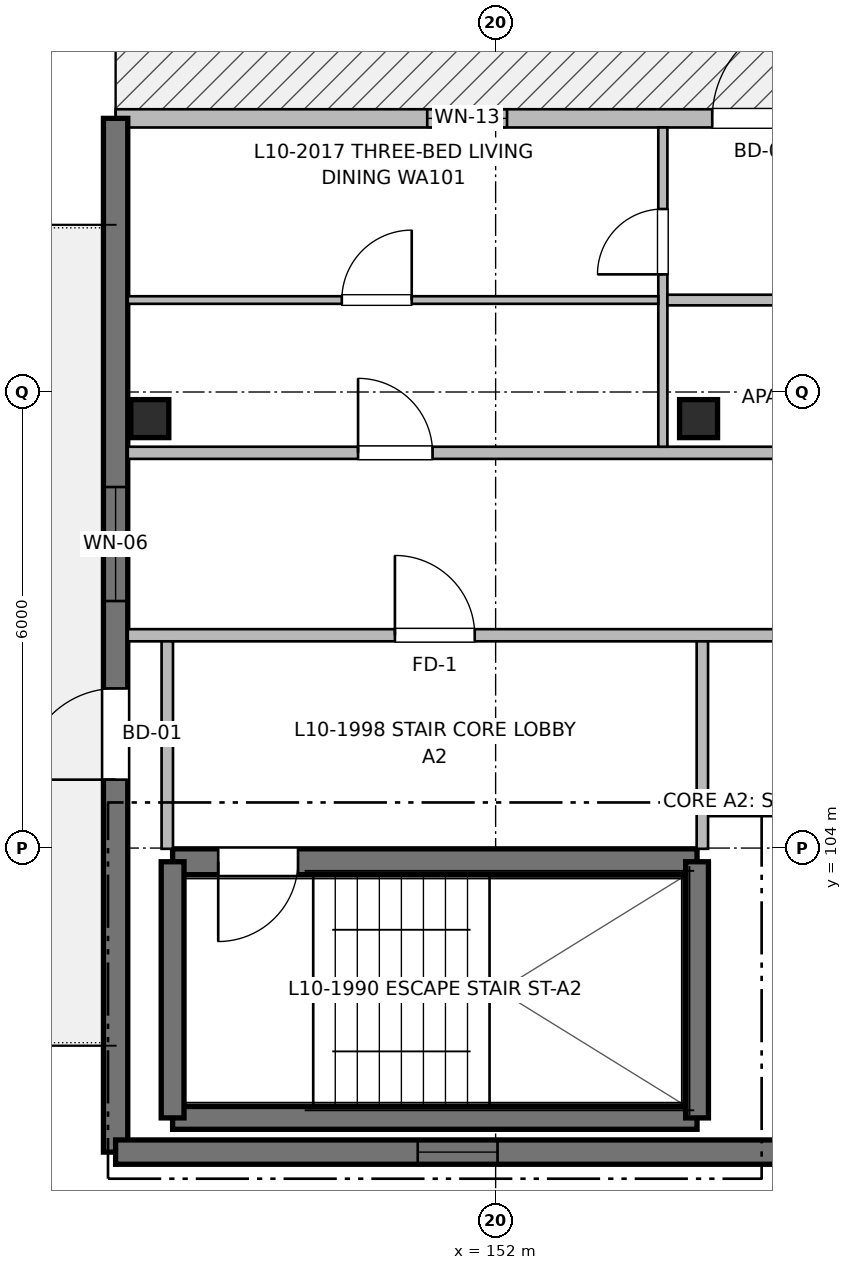
"""IFC4 building model, lengths in metres.
Left out: names, types, materials, properties, quantities, classifications, styles, units other than length and angle.
Written with IfcOpenShell. Run it as: python <this file> out.ifc"""

import sys

from ifc_helpers import new_model, si_unit, direction, frame, frame_2d, origin, origin_2d, place, context, subcontext, project, spatial, rectangle, extrude, element, fill, save


model = new_model("IFC4")
c1 = context("Model", 3, precision=1e-05, world=origin(), true_north=direction((0.0, 1.0)))
c2 = subcontext(c1, "Body", "Model", "MODEL_VIEW")
j1 = project(units=[si_unit("LENGTHUNIT", "METRE"), si_unit("PLANEANGLEUNIT", "RADIAN")], contexts=[c1])
p1 = place(None, origin())
s1 = spatial("IfcSite", under=j1, at=p1, CompositionType="ELEMENT")
p2 = place(p1, origin())
s2 = spatial("IfcBuilding", under=s1, at=p2, CompositionType="ELEMENT")
p3 = place(p2, frame((0.0, 0.0, 32.96)))
s3 = spatial("IfcBuildingStorey", under=s2, at=p3, CompositionType="ELEMENT", Elevation=32.96)
for number, where, z_axis, x_axis in (
    (1, (147.45, 109.65, 0.0), (0.0, 0.0, 1.0), (1.0, 0.0, 0.0)),
    (2, (154.67, 109.65, 0.0), (0.0, 0.0, 1.0), (1.0, 0.0, 0.0)),
):
    element("IfcColumn", number, at=place(p3, frame(where, z_axis=z_axis, x_axis=x_axis)), inside=s3, PredefinedType="COLUMN", context=c2, shape_type="SweptSolid", body=[
        extrude(rectangle(XDim=0.5, YDim=0.5, at=origin_2d()), origin(), (0.0, 0.0, 1.0), 3.2),
    ])
p4 = place(p3, frame((147.75, 100.45, 0.0), z_axis=(0.0, 0.0, 1.0), x_axis=(1.0, 0.0, 0.0)))
e3 = element("IfcWall", 3, at=p4, inside=s3, PredefinedType="SHEAR", context=c2, shape_type="SweptSolid", body=[
    extrude(rectangle(XDim=6.9, YDim=0.3, at=frame_2d((3.45, 0.0))), origin(), (0.0, 0.0, 1.0), 3.2),
])
p5 = place(p3, frame((154.65, 103.82, 0.0), z_axis=(0.0, 0.0, 1.0), x_axis=(-1.0, 0.0, 0.0)))
e4 = element("IfcWall", 4, at=p5, inside=s3, PredefinedType="SHEAR", context=c2, shape_type="SweptSolid", body=[
    extrude(rectangle(XDim=6.9, YDim=0.34, at=frame_2d((3.45, 0.0))), origin(), (0.0, 0.0, 1.0), 3.2),
])
p6 = place(p5, frame((5.25, 0.0, 0.0)))
e5 = element("IfcOpeningElement", 5, at=p6, cuts=e4, PredefinedType="OPENING", context=c2, shape_type="SweptSolid", body=[
    extrude(rectangle(XDim=1.05, YDim=2.15, at=frame_2d((0.525, 1.075))), frame((0.0, 0.18, 0.0), z_axis=(0.0, -1.0, 0.0), x_axis=(1.0, 0.0, 0.0)), (0.0, 0.0, 1.0), 0.36),
])
for number, where, z_axis, x_axis in (
    (6, (147.75, 103.82, 0.0), (0.0, 0.0, 1.0), (0.0, -1.0, 0.0)),
    (7, (154.65, 100.45, 0.0), (0.0, 0.0, 1.0), (0.0, 1.0, 0.0)),
):
    element("IfcWall", number, at=place(p3, frame(where, z_axis=z_axis, x_axis=x_axis)), inside=s3, PredefinedType="SHEAR", context=c2, shape_type="SweptSolid", body=[
        extrude(rectangle(XDim=3.37, YDim=0.3, at=frame_2d((1.685, 0.0))), origin(), (0.0, 0.0, 1.0), 3.2),
    ])
p7 = place(p3, frame((147.0, 113.6, 0.0), z_axis=(0.0, 0.0, 1.0), x_axis=(1.0, 0.0, 0.0)))
e8 = element("IfcWall", 8, at=p7, inside=s3, PredefinedType="SOLIDWALL", context=c2, shape_type="SweptSolid", body=[
    extrude(rectangle(XDim=37.0, YDim=0.24, at=frame_2d((18.5, 0.0))), origin(), (0.0, 0.0, 1.0), 2.98),
])
p8 = place(p7, frame((7.85, 0.0, 0.0)))
e9 = element("IfcOpeningElement", 9, at=p8, cuts=e8, PredefinedType="OPENING", context=c2, shape_type="SweptSolid", body=[
    extrude(rectangle(XDim=1.35, YDim=2.2, at=frame_2d((0.675, 1.1))), frame((0.0, 0.13, 0.0), z_axis=(0.0, -1.0, 0.0), x_axis=(1.0, 0.0, 0.0)), (0.0, 0.0, 1.0), 0.26),
])
p9 = place(p7, frame((4.1, 0.0, 0.9)))
e10 = element("IfcOpeningElement", 10, at=p9, cuts=e8, PredefinedType="OPENING", context=c2, shape_type="SweptSolid", body=[
    extrude(rectangle(XDim=1.05, YDim=1.15, at=frame_2d((0.525, 0.575))), frame((0.0, 0.13, 0.0), z_axis=(0.0, -1.0, 0.0), x_axis=(1.0, 0.0, 0.0)), (0.0, 0.0, 1.0), 0.26),
])
p10 = place(p7, frame((13.275, 0.0, 0.9)))
e11 = element("IfcOpeningElement", 11, at=p10, cuts=e8, PredefinedType="OPENING", context=c2, shape_type="SweptSolid", body=[
    extrude(rectangle(XDim=1.2, YDim=1.05, at=frame_2d((0.6, 0.525))), frame((0.0, 0.13, 0.0), z_axis=(0.0, -1.0, 0.0), x_axis=(1.0, 0.0, 0.0)), (0.0, 0.0, 1.0), 0.26),
])
p11 = place(p7, frame((22.8, 0.0, 0.9)))
e12 = element("IfcOpeningElement", 12, at=p11, cuts=e8, PredefinedType="OPENING", context=c2, shape_type="SweptSolid", body=[
    extrude(rectangle(XDim=0.65, YDim=0.95, at=frame_2d((0.325, 0.475))), frame((0.0, 0.13, 0.0), z_axis=(0.0, -1.0, 0.0), x_axis=(1.0, 0.0, 0.0)), (0.0, 0.0, 1.0), 0.26),
])
p12 = place(p7, frame((32.275, 0.0, 0.62)))
e13 = element("IfcOpeningElement", 13, at=p12, cuts=e8, PredefinedType="OPENING", context=c2, shape_type="SweptSolid", body=[
    extrude(rectangle(XDim=1.1, YDim=1.6, at=frame_2d((0.55, 0.8))), frame((0.0, 0.13, 0.0), z_axis=(0.0, -1.0, 0.0), x_axis=(1.0, 0.0, 0.0)), (0.0, 0.0, 1.0), 0.26),
])
p13 = place(p7, frame((27.445, 0.0, 0.82)))
e14 = element("IfcOpeningElement", 14, at=p13, cuts=e8, PredefinedType="OPENING", context=c2, shape_type="SweptSolid", body=[
    extrude(rectangle(XDim=1.5, YDim=1.4, at=frame_2d((0.75, 0.7))), frame((0.0, 0.13, 0.0), z_axis=(0.0, -1.0, 0.0), x_axis=(1.0, 0.0, 0.0)), (0.0, 0.0, 1.0), 0.26),
])
p14 = place(p3, frame((147.0, 100.0, 0.0), z_axis=(0.0, 0.0, 1.0), x_axis=(0.0, 1.0, 0.0)))
e15 = element("IfcWall", 15, at=p14, inside=s3, PredefinedType="SHEAR", context=c2, shape_type="SweptSolid", body=[
    extrude(rectangle(XDim=13.6, YDim=0.32, at=frame_2d((6.8, 0.0))), origin(), (0.0, 0.0, 1.0), 2.98),
])
p15 = place(p14, frame((4.9, 0.0, 0.0)))
e16 = element("IfcOpeningElement", 16, at=p15, cuts=e15, PredefinedType="OPENING", context=c2, shape_type="SweptSolid", body=[
    extrude(rectangle(XDim=1.2, YDim=2.2, at=frame_2d((0.6, 1.1))), frame((0.0, 0.17, 0.0), z_axis=(0.0, -1.0, 0.0), x_axis=(1.0, 0.0, 0.0)), (0.0, 0.0, 1.0), 0.34),
])
p16 = place(p14, frame((7.25, 0.0, 0.82)))
e17 = element("IfcOpeningElement", 17, at=p16, cuts=e15, PredefinedType="OPENING", context=c2, shape_type="SweptSolid", body=[
    extrude(rectangle(XDim=1.5, YDim=1.4, at=frame_2d((0.75, 0.7))), frame((0.0, 0.17, 0.0), z_axis=(0.0, -1.0, 0.0), x_axis=(1.0, 0.0, 0.0)), (0.0, 0.0, 1.0), 0.34),
])
p17 = place(p3, frame((156.0, 100.0, 0.0), z_axis=(0.0, 0.0, 1.0), x_axis=(-1.0, 0.0, 0.0)))
e18 = element("IfcWall", 18, at=p17, inside=s3, PredefinedType="SHEAR", context=c2, shape_type="SweptSolid", body=[
    extrude(rectangle(XDim=9.0, YDim=0.32, at=frame_2d((4.5, 0.0))), origin(), (0.0, 0.0, 1.0), 2.98),
])
p18 = place(p17, frame((3.975, 0.0, 0.9)))
e19 = element("IfcOpeningElement", 19, at=p18, cuts=e18, PredefinedType="OPENING", context=c2, shape_type="SweptSolid", body=[
    extrude(rectangle(XDim=1.05, YDim=1.15, at=frame_2d((0.525, 0.575))), frame((0.0, 0.17, 0.0), z_axis=(0.0, -1.0, 0.0), x_axis=(1.0, 0.0, 0.0)), (0.0, 0.0, 1.0), 0.34),
])
p19 = place(p3, frame((147.16, 106.8, 0.0), z_axis=(0.0, 0.0, 1.0), x_axis=(1.0, 0.0, 0.0)))
e20 = element("IfcWall", 20, at=p19, inside=s3, PredefinedType="PARTITIONING", context=c2, shape_type="SweptSolid", body=[
    extrude(rectangle(XDim=27.64, YDim=0.16, at=frame_2d((13.82, 0.0))), origin(), (0.0, 0.0, 1.0), 2.935),
])
p20 = place(p19, frame((3.515, 0.0, 0.0)))
e21 = element("IfcOpeningElement", 21, at=p20, cuts=e20, PredefinedType="OPENING", context=c2, shape_type="SweptSolid", body=[
    extrude(rectangle(XDim=1.05, YDim=2.15, at=frame_2d((0.525, 1.075))), frame((0.0, 0.09, 0.0), z_axis=(0.0, -1.0, 0.0), x_axis=(1.0, 0.0, 0.0)), (0.0, 0.0, 1.0), 0.18),
])
p21 = place(p19, frame((10.69, 0.0, 0.0)))
e22 = element("IfcOpeningElement", 22, at=p21, cuts=e20, PredefinedType="OPENING", context=c2, shape_type="SweptSolid", body=[
    extrude(rectangle(XDim=0.98, YDim=2.15, at=frame_2d((0.49, 1.075))), frame((0.0, 0.09, 0.0), z_axis=(0.0, -1.0, 0.0), x_axis=(1.0, 0.0, 0.0)), (0.0, 0.0, 1.0), 0.18),
])
p22 = place(p3, frame((147.16, 109.2, 0.0), z_axis=(0.0, 0.0, 1.0), x_axis=(1.0, 0.0, 0.0)))
e23 = element("IfcWall", 23, at=p22, inside=s3, PredefinedType="PARTITIONING", context=c2, shape_type="SweptSolid", body=[
    extrude(rectangle(XDim=36.68, YDim=0.16, at=frame_2d((18.34, 0.0))), origin(), (0.0, 0.0, 1.0), 2.935),
])
p23 = place(p22, frame((3.03, 0.0, 0.0)))
e24 = element("IfcOpeningElement", 24, at=p23, cuts=e23, PredefinedType="OPENING", context=c2, shape_type="SweptSolid", body=[
    extrude(rectangle(XDim=0.98, YDim=2.15, at=frame_2d((0.49, 1.075))), frame((0.0, 0.09, 0.0), z_axis=(0.0, -1.0, 0.0), x_axis=(1.0, 0.0, 0.0)), (0.0, 0.0, 1.0), 0.18),
])
p24 = place(p22, frame((15.72, 0.0, 0.0)))
e25 = element("IfcOpeningElement", 25, at=p24, cuts=e23, PredefinedType="OPENING", context=c2, shape_type="SweptSolid", body=[
    extrude(rectangle(XDim=0.98, YDim=2.15, at=frame_2d((0.49, 1.075))), frame((0.0, 0.09, 0.0), z_axis=(0.0, -1.0, 0.0), x_axis=(1.0, 0.0, 0.0)), (0.0, 0.0, 1.0), 0.18),
])
p25 = place(p22, frame((27.57, 0.0, 0.0)))
e26 = element("IfcOpeningElement", 26, at=p25, cuts=e23, PredefinedType="OPENING", context=c2, shape_type="SweptSolid", body=[
    extrude(rectangle(XDim=0.98, YDim=2.15, at=frame_2d((0.49, 1.075))), frame((0.0, 0.09, 0.0), z_axis=(0.0, -1.0, 0.0), x_axis=(1.0, 0.0, 0.0)), (0.0, 0.0, 1.0), 0.18),
])
for number, where, z_axis, x_axis in (
    (27, (147.68, 103.99, 0.0), (0.0, 0.0, 1.0), (0.0, 1.0, 0.0)),
    (28, (154.72, 103.99, 0.0), (0.0, 0.0, 1.0), (0.0, 1.0, 0.0)),
):
    element("IfcWall", number, at=place(p3, frame(where, z_axis=z_axis, x_axis=x_axis)), inside=s3, PredefinedType="PARTITIONING", context=c2, shape_type="SweptSolid", body=[
        extrude(rectangle(XDim=2.73, YDim=0.15, at=frame_2d((1.365, 0.0))), origin(), (0.0, 0.0, 1.0), 2.935),
    ])
p26 = place(p3, frame((154.2, 109.28, 0.0), z_axis=(0.0, 0.0, 1.0), x_axis=(0.0, 1.0, 0.0)))
e29 = element("IfcWall", 29, at=p26, inside=s3, PredefinedType="PARTITIONING", context=c2, shape_type="SweptSolid", body=[
    extrude(rectangle(XDim=4.2, YDim=0.12, at=frame_2d((2.1, 0.0))), origin(), (0.0, 0.0, 1.0), 2.935),
])
p27 = place(p26, frame((2.268, 0.0, 0.0)))
e30 = element("IfcOpeningElement", 30, at=p27, cuts=e29, PredefinedType="OPENING", context=c2, shape_type="SweptSolid", body=[
    extrude(rectangle(XDim=0.86, YDim=2.1, at=frame_2d((0.43, 1.05))), frame((0.0, 0.07, 0.0), z_axis=(0.0, -1.0, 0.0), x_axis=(1.0, 0.0, 0.0)), (0.0, 0.0, 1.0), 0.14),
])
p28 = place(p3, frame((154.26, 111.21, 0.0), z_axis=(0.0, 0.0, 1.0), x_axis=(1.0, 0.0, 0.0)))
e31 = element("IfcWall", 31, at=p28, inside=s3, PredefinedType="PARTITIONING", context=c2, shape_type="SweptSolid", body=[
    extrude(rectangle(XDim=5.04, YDim=0.14, at=frame_2d((2.52, 0.0))), origin(), (0.0, 0.0, 1.0), 2.935),
])
p29 = place(p28, frame((2.04, 0.0, 0.0)))
e32 = element("IfcOpeningElement", 32, at=p29, cuts=e31, PredefinedType="OPENING", context=c2, shape_type="SweptSolid", body=[
    extrude(rectangle(XDim=0.85, YDim=2.05, at=frame_2d((0.425, 1.025))), frame((0.0, 0.08, 0.0), z_axis=(0.0, -1.0, 0.0), x_axis=(1.0, 0.0, 0.0)), (0.0, 0.0, 1.0), 0.16),
])
p30 = place(p3, frame((147.16, 111.21, 0.0), z_axis=(0.0, 0.0, 1.0), x_axis=(1.0, 0.0, 0.0)))
e33 = element("IfcWall", 33, at=p30, inside=s3, PredefinedType="PARTITIONING", context=c2, shape_type="SweptSolid", body=[
    extrude(rectangle(XDim=6.98, YDim=0.1, at=frame_2d((3.49, 0.0))), origin(), (0.0, 0.0, 1.0), 2.935),
])
p31 = place(p30, frame((2.816, 0.0, 0.0)))
e34 = element("IfcOpeningElement", 34, at=p31, cuts=e33, PredefinedType="OPENING", context=c2, shape_type="SweptSolid", body=[
    extrude(rectangle(XDim=0.92, YDim=2.1, at=frame_2d((0.46, 1.05))), frame((0.0, 0.06, 0.0), z_axis=(0.0, -1.0, 0.0), x_axis=(1.0, 0.0, 0.0)), (0.0, 0.0, 1.0), 0.12),
])
p32 = place(p3, frame((154.8, 104.47, 0.0), z_axis=(0.0, 0.0, 1.0), x_axis=(1.0, 0.0, 0.0)))
e35 = element("IfcWall", 35, at=p32, inside=s3, PredefinedType="PARTITIONING", context=c2, shape_type="SweptSolid", body=[
    extrude(rectangle(XDim=7.02, YDim=0.1, at=frame_2d((3.51, 0.0))), origin(), (0.0, 0.0, 1.0), 2.935),
])
p33 = place(p32, frame((2.974, 0.0, 0.0)))
e36 = element("IfcOpeningElement", 36, at=p33, cuts=e35, PredefinedType="OPENING", context=c2, shape_type="SweptSolid", body=[
    extrude(rectangle(XDim=0.92, YDim=2.1, at=frame_2d((0.46, 1.05))), frame((0.0, 0.06, 0.0), z_axis=(0.0, -1.0, 0.0), x_axis=(1.0, 0.0, 0.0)), (0.0, 0.0, 1.0), 0.12),
])
p34 = place(p6, origin())
e37 = element("IfcDoor", 37, at=p34, inside=s3, OperationType="SINGLE_SWING_RIGHT", PredefinedType="DOOR", context=c2, shape_type="SweptSolid", body=[
    extrude(rectangle(XDim=1.05, YDim=2.15, at=frame_2d((0.525, 1.075))), frame((0.0, 0.025, 0.0), z_axis=(0.0, -1.0, 0.0), x_axis=(1.0, 0.0, 0.0)), (0.0, 0.0, 1.0), 0.05),
])
fill(e5, e37)
p35 = place(p8, origin())
e38 = element("IfcDoor", 38, at=p35, inside=s3, OperationType="SINGLE_SWING_RIGHT", PredefinedType="DOOR", context=c2, shape_type="SweptSolid", body=[
    extrude(rectangle(XDim=1.35, YDim=2.2, at=frame_2d((0.675, 1.1))), frame((0.0, 0.025, 0.0), z_axis=(0.0, -1.0, 0.0), x_axis=(1.0, 0.0, 0.0)), (0.0, 0.0, 1.0), 0.05),
])
fill(e9, e38)
p36 = place(p9, origin())
e39 = element("IfcWindow", 39, at=p36, inside=s3, PartitioningType="SINGLE_PANEL", PredefinedType="WINDOW", context=c2, shape_type="SweptSolid", body=[
    extrude(rectangle(XDim=1.05, YDim=1.15, at=frame_2d((0.525, 0.575))), frame((0.0, 0.03, 0.0), z_axis=(0.0, -1.0, 0.0), x_axis=(1.0, 0.0, 0.0)), (0.0, 0.0, 1.0), 0.06),
])
fill(e10, e39)
p37 = place(p15, origin())
e40 = element("IfcDoor", 40, at=p37, inside=s3, OperationType="SINGLE_SWING_LEFT", PredefinedType="DOOR", context=c2, shape_type="SweptSolid", body=[
    extrude(rectangle(XDim=1.2, YDim=2.2, at=frame_2d((0.6, 1.1))), frame((0.0, 0.025, 0.0), z_axis=(0.0, -1.0, 0.0), x_axis=(1.0, 0.0, 0.0)), (0.0, 0.0, 1.0), 0.05),
])
fill(e16, e40)
p38 = place(p16, origin())
e41 = element("IfcWindow", 41, at=p38, inside=s3, PartitioningType="SINGLE_PANEL", PredefinedType="WINDOW", context=c2, shape_type="SweptSolid", body=[
    extrude(rectangle(XDim=1.5, YDim=1.4, at=frame_2d((0.75, 0.7))), frame((0.0, 0.03, 0.0), z_axis=(0.0, -1.0, 0.0), x_axis=(1.0, 0.0, 0.0)), (0.0, 0.0, 1.0), 0.06),
])
fill(e17, e41)
p39 = place(p18, origin())
e42 = element("IfcWindow", 42, at=p39, inside=s3, PartitioningType="SINGLE_PANEL", PredefinedType="WINDOW", context=c2, shape_type="SweptSolid", body=[
    extrude(rectangle(XDim=1.05, YDim=1.15, at=frame_2d((0.525, 0.575))), frame((0.0, 0.03, 0.0), z_axis=(0.0, -1.0, 0.0), x_axis=(1.0, 0.0, 0.0)), (0.0, 0.0, 1.0), 0.06),
])
fill(e19, e42)
p40 = place(p20, origin())
e43 = element("IfcDoor", 43, at=p40, inside=s3, OperationType="SINGLE_SWING_LEFT", PredefinedType="DOOR", context=c2, shape_type="SweptSolid", body=[
    extrude(rectangle(XDim=1.05, YDim=2.15, at=frame_2d((0.525, 1.075))), frame((0.0, 0.025, 0.0), z_axis=(0.0, -1.0, 0.0), x_axis=(1.0, 0.0, 0.0)), (0.0, 0.0, 1.0), 0.05),
])
fill(e21, e43)
p41 = place(p23, origin())
e44 = element("IfcDoor", 44, at=p41, inside=s3, OperationType="SINGLE_SWING_LEFT", PredefinedType="DOOR", context=c2, shape_type="SweptSolid", body=[
    extrude(rectangle(XDim=0.98, YDim=2.15, at=frame_2d((0.49, 1.075))), frame((0.0, 0.025, 0.0), z_axis=(0.0, -1.0, 0.0), x_axis=(1.0, 0.0, 0.0)), (0.0, 0.0, 1.0), 0.05),
])
fill(e24, e44)
p42 = place(p31, origin())
e45 = element("IfcDoor", 45, at=p42, inside=s3, OperationType="SINGLE_SWING_RIGHT", PredefinedType="DOOR", context=c2, shape_type="SweptSolid", body=[
    extrude(rectangle(XDim=0.92, YDim=2.1, at=frame_2d((0.46, 1.05))), frame((0.0, 0.025, 0.0), z_axis=(0.0, -1.0, 0.0), x_axis=(1.0, 0.0, 0.0)), (0.0, 0.0, 1.0), 0.05),
])
fill(e34, e45)
p43 = place(p27, origin())
e46 = element("IfcDoor", 46, at=p43, inside=s3, OperationType="SINGLE_SWING_LEFT", PredefinedType="DOOR", context=c2, shape_type="SweptSolid", body=[
    extrude(rectangle(XDim=0.86, YDim=2.1, at=frame_2d((0.43, 1.05))), frame((0.0, 0.025, 0.0), z_axis=(0.0, -1.0, 0.0), x_axis=(1.0, 0.0, 0.0)), (0.0, 0.0, 1.0), 0.05),
])
fill(e30, e46)
save(model, sys.argv[1])
